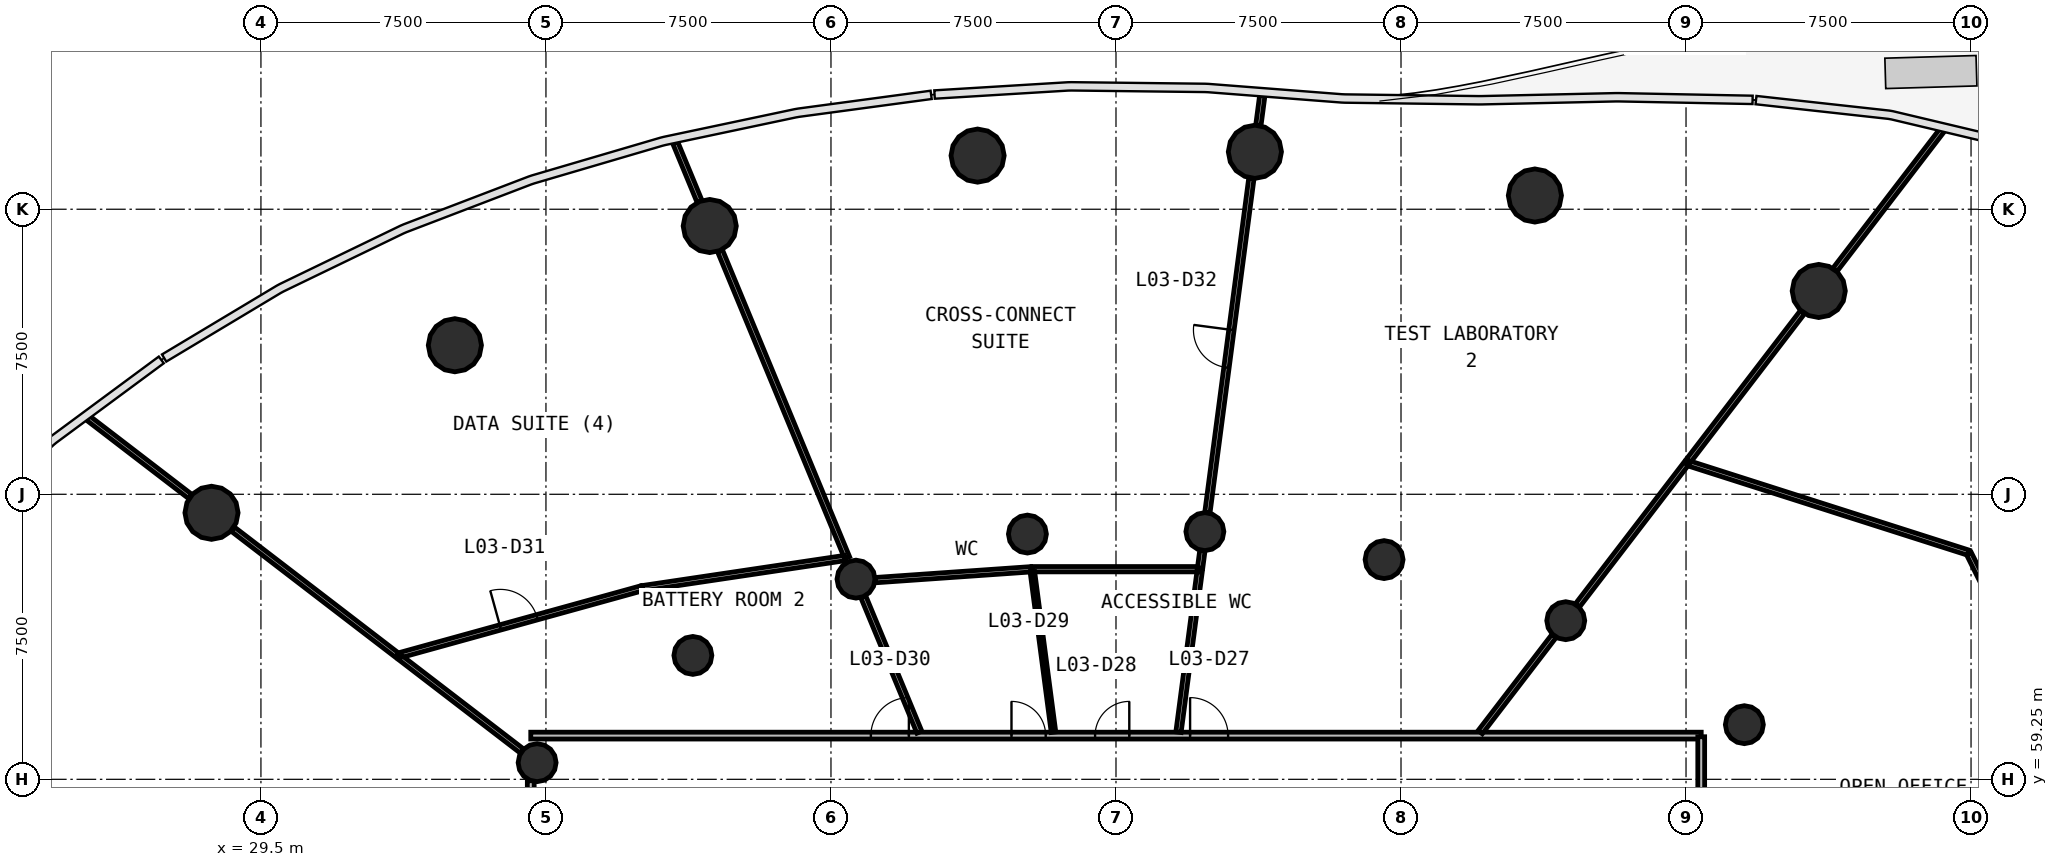
"""IFC4 building model, lengths in metres.
Left out: names, types, materials, properties, quantities, classifications, styles, units other than length and angle.
Written with IfcOpenShell. Run it as: python <this file> out.ifc"""

import sys

from ifc_helpers import new_model, si_unit, direction, frame, frame_2d, origin, origin_2d, place, context, subcontext, project, spatial, rectangle, circle, extrude, source, transform, mapped, element, fill, save


model = new_model("IFC4")
c1 = context("Model", 3, precision=1e-05, world=origin(), true_north=direction((0.0, 1.0)))
c2 = subcontext(c1, "Body", "Model", "MODEL_VIEW")
j1 = project(units=[si_unit("LENGTHUNIT", "METRE"), si_unit("PLANEANGLEUNIT", "RADIAN")], contexts=[c1])
p1 = place(None, origin())
s1 = spatial("IfcSite", under=j1, at=p1, CompositionType="ELEMENT")
p2 = place(p1, origin())
s2 = spatial("IfcBuilding", under=s1, at=p2, CompositionType="ELEMENT")
p3 = place(p2, frame((0.0, 0.0, 13.8)))
s3 = spatial("IfcBuildingStorey", under=s2, at=p3, CompositionType="ELEMENT", Elevation=13.8)
m1 = source(origin(), c2, "Body", "SweptSolid", [
    extrude(circle(Radius=0.7, at=origin_2d()), origin(), (0.0, 0.0, 1.0), 4.4),
])
for number, where, z_axis, x_axis in (
    (1, (70.492, 72.1, 0.0), (0.0, 0.0, 1.0), (1.0, 0.0, 0.0)),
    (2, (63.023, 74.611, 0.0), (0.0, 0.0, 1.0), (1.0, 0.0, 0.0)),
    (3, (55.655, 75.761, 0.0), (0.0, 0.0, 1.0), (1.0, 0.0, 0.0)),
    (4, (48.358, 75.661, 0.0), (0.0, 0.0, 1.0), (1.0, 0.0, 0.0)),
    (5, (41.31, 73.809, 0.0), (0.0, 0.0, 1.0), (1.0, 0.0, 0.0)),
    (6, (34.604, 70.672, 0.0), (0.0, 0.0, 1.0), (1.0, 0.0, 0.0)),
    (7, (28.199, 66.263, 0.0), (0.0, 0.0, 1.0), (1.0, 0.0, 0.0)),
):
    element("IfcColumn", number, at=place(p3, frame(where, z_axis=z_axis, x_axis=x_axis)), inside=s3, PredefinedType="COLUMN", context=c2, shape_type="MappedRepresentation", body=[
        mapped(m1, transform((0.0, 0.0, 0.0), scale=1.0)),
    ])
m2 = source(origin(), c2, "Body", "SweptSolid", [
    extrude(circle(Radius=0.5, at=origin_2d()), origin(), (0.0, 0.0, 1.0), 4.4),
])
for number, where, z_axis, x_axis in (
    (8, (68.535, 60.688, 0.0), (0.0, 0.0, 1.0), (1.0, 0.0, 0.0)),
    (9, (63.835, 63.424, 0.0), (0.0, 0.0, 1.0), (1.0, 0.0, 0.0)),
    (10, (59.055, 65.031, 0.0), (0.0, 0.0, 1.0), (1.0, 0.0, 0.0)),
    (11, (54.339, 65.767, 0.0), (0.0, 0.0, 1.0), (1.0, 0.0, 0.0)),
    (12, (49.669, 65.703, 0.0), (0.0, 0.0, 1.0), (1.0, 0.0, 0.0)),
    (13, (45.158, 64.518, 0.0), (0.0, 0.0, 1.0), (1.0, 0.0, 0.0)),
    (14, (40.866, 62.51, 0.0), (0.0, 0.0, 1.0), (1.0, 0.0, 0.0)),
    (15, (36.768, 59.688, 0.0), (0.0, 0.0, 1.0), (1.0, 0.0, 0.0)),
):
    element("IfcColumn", number, at=place(p3, frame(where, z_axis=z_axis, x_axis=x_axis)), inside=s3, PredefinedType="COLUMN", context=c2, shape_type="MappedRepresentation", body=[
        mapped(m2, transform((0.0, 0.0, 0.0), scale=1.0)),
    ])
p4 = place(p3, frame((36.6, 60.4, 0.0), z_axis=(0.0, 0.0, 1.0), x_axis=(1.0, 0.0, 0.0)))
e16 = element("IfcWall", 16, at=p4, inside=s3, PredefinedType="PARTITIONING", context=c2, shape_type="SweptSolid", body=[
    extrude(rectangle(XDim=30.8, YDim=0.18, at=frame_2d((15.4, 0.0))), origin(), (0.0, 0.0, 1.0), 3.25),
])
p5 = place(p4, frame((17.35, 0.0, 0.0)))
e17 = element("IfcOpeningElement", 17, at=p5, cuts=e16, PredefinedType="OPENING", context=c2, shape_type="SweptSolid", body=[
    extrude(rectangle(XDim=1.0, YDim=2.1, at=frame_2d((0.5, 1.05))), frame((0.0, 0.1, 0.0), z_axis=(0.0, -1.0, 0.0), x_axis=(1.0, 0.0, 0.0)), (0.0, 0.0, 1.0), 0.2),
])
p6 = place(p4, frame((14.85, 0.0, 0.0)))
e18 = element("IfcOpeningElement", 18, at=p6, cuts=e16, PredefinedType="OPENING", context=c2, shape_type="SweptSolid", body=[
    extrude(rectangle(XDim=0.9, YDim=2.1, at=frame_2d((0.45, 1.05))), frame((0.0, 0.1, 0.0), z_axis=(0.0, -1.0, 0.0), x_axis=(1.0, 0.0, 0.0)), (0.0, 0.0, 1.0), 0.2),
])
p7 = place(p4, frame((12.65, 0.0, 0.0)))
e19 = element("IfcOpeningElement", 19, at=p7, cuts=e16, PredefinedType="OPENING", context=c2, shape_type="SweptSolid", body=[
    extrude(rectangle(XDim=0.9, YDim=2.1, at=frame_2d((0.45, 1.05))), frame((0.0, 0.1, 0.0), z_axis=(0.0, -1.0, 0.0), x_axis=(1.0, 0.0, 0.0)), (0.0, 0.0, 1.0), 0.2),
])
p8 = place(p4, frame((8.95, 0.0, 0.0)))
e20 = element("IfcOpeningElement", 20, at=p8, cuts=e16, PredefinedType="OPENING", context=c2, shape_type="SweptSolid", body=[
    extrude(rectangle(XDim=1.0, YDim=2.1, at=frame_2d((0.5, 1.05))), frame((0.0, 0.1, 0.0), z_axis=(0.0, -1.0, 0.0), x_axis=(1.0, 0.0, 0.0)), (0.0, 0.0, 1.0), 0.2),
])
p9 = place(p3, frame((67.4, 60.37, 0.0), z_axis=(0.0, 0.0, 1.0), x_axis=(0.0, -1.0, 0.0)))
e21 = element("IfcWall", 21, at=p9, inside=s3, PredefinedType="PARTITIONING", context=c2, shape_type="SweptSolid", body=[
    extrude(rectangle(XDim=23.583, YDim=0.18, at=frame_2d((11.791, 0.0))), origin(), (0.0, 0.0, 1.0), 3.25),
])
p10 = place(p9, frame((11.333, 0.0, 0.0)))
e22 = element("IfcOpeningElement", 22, at=p10, cuts=e21, PredefinedType="OPENING", context=c2, shape_type="SweptSolid", body=[
    extrude(rectangle(XDim=1.0, YDim=2.1, at=frame_2d((0.5, 1.05))), frame((0.0, 0.1, 0.0), z_axis=(0.0, -1.0, 0.0), x_axis=(1.0, 0.0, 0.0)), (0.0, 0.0, 1.0), 0.2),
])
p11 = place(p9, frame((9.133, 0.0, 0.0)))
e23 = element("IfcOpeningElement", 23, at=p11, cuts=e21, PredefinedType="OPENING", context=c2, shape_type="SweptSolid", body=[
    extrude(rectangle(XDim=1.0, YDim=2.1, at=frame_2d((0.5, 1.05))), frame((0.0, 0.1, 0.0), z_axis=(0.0, -1.0, 0.0), x_axis=(1.0, 0.0, 0.0)), (0.0, 0.0, 1.0), 0.2),
])
p12 = place(p9, frame((19.133, 0.0, 0.0)))
e24 = element("IfcOpeningElement", 24, at=p12, cuts=e21, PredefinedType="OPENING", context=c2, shape_type="SweptSolid", body=[
    extrude(rectangle(XDim=1.0, YDim=2.1, at=frame_2d((0.5, 1.05))), frame((0.0, 0.1, 0.0), z_axis=(0.0, -1.0, 0.0), x_axis=(1.0, 0.0, 0.0)), (0.0, 0.0, 1.0), 0.2),
])
p13 = place(p3, frame((36.6, 35.63, 0.0), z_axis=(0.0, 0.0, 1.0), x_axis=(0.0, 1.0, 0.0)))
e25 = element("IfcWall", 25, at=p13, inside=s3, PredefinedType="PARTITIONING", context=c2, shape_type="SweptSolid", body=[
    extrude(rectangle(XDim=23.583, YDim=0.18, at=frame_2d((11.791, 0.0))), origin(), (0.0, 0.0, 1.0), 3.25),
])
p14 = place(p13, frame((11.333, 0.0, 0.0)))
e26 = element("IfcOpeningElement", 26, at=p14, cuts=e25, PredefinedType="OPENING", context=c2, shape_type="SweptSolid", body=[
    extrude(rectangle(XDim=1.0, YDim=2.1, at=frame_2d((0.5, 1.05))), frame((0.0, 0.1, 0.0), z_axis=(0.0, -1.0, 0.0), x_axis=(1.0, 0.0, 0.0)), (0.0, 0.0, 1.0), 0.2),
])
p15 = place(p3, frame((54.405, 66.267, 0.0), z_axis=(0.0, 0.0, 1.0), x_axis=(0.130521426482, 0.991445488783, 0.0)))
e27 = element("IfcWall", 27, at=p15, inside=s3, PredefinedType="PARTITIONING", context=c2, shape_type="SweptSolid", body=[
    extrude(rectangle(XDim=8.872, YDim=0.14, at=frame_2d((4.436, 0.0))), origin(), (0.0, 0.0, 1.0), 3.25),
])
p16 = place(p15, frame((3.85, 0.0, 0.0)))
e28 = element("IfcOpeningElement", 28, at=p16, cuts=e27, PredefinedType="OPENING", context=c2, shape_type="SweptSolid", body=[
    extrude(rectangle(XDim=1.0, YDim=2.1, at=frame_2d((0.5, 1.05))), frame((0.0, 0.08, 0.0), z_axis=(0.0, -1.0, 0.0), x_axis=(1.0, 0.0, 0.0)), (0.0, 0.0, 1.0), 0.16),
])
p17 = place(p3, frame((44.925, 65.081, 0.0), z_axis=(0.0, 0.0, 1.0), x_axis=(-0.382688905141, 0.923877265594, 0.0)))
e29 = element("IfcWall", 29, at=p17, inside=s3, PredefinedType="PARTITIONING", context=c2, shape_type="SweptSolid", body=[
    extrude(rectangle(XDim=8.741, YDim=0.14, at=frame_2d((4.371, 0.0))), origin(), (0.0, 0.0, 1.0), 3.25),
])
p18 = place(p3, frame((74.432, 65.213, 0.0), z_axis=(0.0, 0.0, 1.0), x_axis=(-0.952603673554, 0.304214136967, 0.0)))
e30 = element("IfcWall", 30, at=p18, inside=s3, PredefinedType="PARTITIONING", context=c2, shape_type="SweptSolid", body=[
    extrude(rectangle(XDim=7.777, YDim=0.14, at=frame_2d((3.889, 0.0))), origin(), (0.0, 0.0, 1.0), 3.25),
])
p19 = place(p3, frame((77.696, 58.644, 0.0), z_axis=(0.0, 0.0, 1.0), x_axis=(-0.444912861123, 0.895573864071, 0.0)))
e31 = element("IfcWall", 31, at=p19, inside=s3, PredefinedType="PARTITIONING", context=c2, shape_type="SweptSolid", body=[
    extrude(rectangle(XDim=7.305, YDim=0.14, at=frame_2d((3.653, 0.0))), origin(), (0.0, 0.0, 1.0), 3.25),
])
p20 = place(p3, frame((33.102, 62.501, 0.0), z_axis=(0.0, 0.0, 1.0), x_axis=(0.963795064715, 0.266644094687, 0.0)))
e32 = element("IfcWall", 32, at=p20, inside=s3, PredefinedType="PARTITIONING", context=c2, shape_type="SweptSolid", body=[
    extrude(rectangle(XDim=6.651, YDim=0.14, at=frame_2d((3.325, 0.0))), origin(), (0.0, 0.0, 1.0), 3.25),
])
p21 = place(p20, frame((2.801, 0.0, 0.0)))
e33 = element("IfcOpeningElement", 33, at=p21, cuts=e32, PredefinedType="OPENING", context=c2, shape_type="SweptSolid", body=[
    extrude(rectangle(XDim=1.0, YDim=2.1, at=frame_2d((0.5, 1.05))), frame((0.0, 0.08, 0.0), z_axis=(0.0, -1.0, 0.0), x_axis=(1.0, 0.0, 0.0)), (0.0, 0.0, 1.0), 0.16),
])
p22 = place(p3, frame((33.078, 62.519, 0.0), z_axis=(0.0, 0.0, 1.0), x_axis=(-0.793366729699, 0.608743979196, 0.0)))
e34 = element("IfcWall", 34, at=p22, inside=s3, PredefinedType="PARTITIONING", context=c2, shape_type="SweptSolid", body=[
    extrude(rectangle(XDim=5.446, YDim=0.14, at=frame_2d((2.723, 0.0))), origin(), (0.0, 0.0, 1.0), 3.25),
])
p23 = place(p3, frame((44.854, 65.071, 0.0), z_axis=(0.0, 0.0, 1.0), x_axis=(-0.989071989563, -0.147433372962, 0.0)))
e35 = element("IfcWall", 35, at=p23, inside=s3, PredefinedType="PARTITIONING", context=c2, shape_type="SweptSolid", body=[
    extrude(rectangle(XDim=5.37, YDim=0.14, at=frame_2d((2.685, 0.0))), origin(), (0.0, 0.0, 1.0), 3.25),
])
p24 = place(p3, frame((67.069, 67.638, 0.0), z_axis=(0.0, 0.0, 1.0), x_axis=(0.608784649219, 0.793335522258, 0.0)))
e36 = element("IfcWall", 36, at=p24, inside=s3, PredefinedType="PARTITIONING", context=c2, shape_type="SweptSolid", body=[
    extrude(rectangle(XDim=4.92, YDim=0.14, at=frame_2d((2.46, 0.0))), origin(), (0.0, 0.0, 1.0), 3.25),
])
p25 = place(p3, frame((64.142, 63.824, 0.0), z_axis=(0.0, 0.0, 1.0), x_axis=(0.608759522286, 0.793354803368, 0.0)))
e37 = element("IfcWall", 37, at=p25, inside=s3, PredefinedType="PARTITIONING", context=c2, shape_type="SweptSolid", body=[
    extrude(rectangle(XDim=4.703, YDim=0.14, at=frame_2d((2.352, 0.0))), origin(), (0.0, 0.0, 1.0), 3.25),
])
p26 = place(p3, frame((70.921, 72.658, 0.0), z_axis=(0.0, 0.0, 1.0), x_axis=(0.608770448494, 0.793346419315, 0.0)))
e38 = element("IfcWall", 38, at=p26, inside=s3, PredefinedType="PARTITIONING", context=c2, shape_type="SweptSolid", body=[
    extrude(rectangle(XDim=4.657, YDim=0.14, at=frame_2d((2.329, 0.0))), origin(), (0.0, 0.0, 1.0), 3.25),
])
p27 = place(p3, frame((54.209, 64.778, 0.0), z_axis=(0.0, 0.0, 1.0), x_axis=(-1.0, 0.0, 0.0)))
e39 = element("IfcWall", 39, at=p27, inside=s3, PredefinedType="PARTITIONING", context=c2, shape_type="SweptSolid", body=[
    extrude(rectangle(XDim=4.418, YDim=0.14, at=frame_2d((2.209, 0.0))), origin(), (0.0, 0.0, 1.0), 3.25),
])
p28 = place(p3, frame((53.644, 60.49, 0.0), z_axis=(0.0, 0.0, 1.0), x_axis=(0.130536146656, 0.991443550797, 0.0)))
e40 = element("IfcWall", 40, at=p28, inside=s3, PredefinedType="PARTITIONING", context=c2, shape_type="SweptSolid", body=[
    extrude(rectangle(XDim=4.255, YDim=0.14, at=frame_2d((2.127, 0.0))), origin(), (0.0, 0.0, 1.0), 3.25),
])
p29 = place(p3, frame((49.761, 64.776, 0.0), z_axis=(0.0, 0.0, 1.0), x_axis=(-0.997577019017, -0.069570763461, 0.0)))
e41 = element("IfcWall", 41, at=p29, inside=s3, PredefinedType="PARTITIONING", context=c2, shape_type="SweptSolid", body=[
    extrude(rectangle(XDim=4.109, YDim=0.14, at=frame_2d((2.055, 0.0))), origin(), (0.0, 0.0, 1.0), 3.25),
])
p30 = place(p3, frame((36.367, 59.995, 0.0), z_axis=(0.0, 0.0, 1.0), x_axis=(-0.793362422365, 0.608749592837, 0.0)))
e42 = element("IfcWall", 42, at=p30, inside=s3, PredefinedType="PARTITIONING", context=c2, shape_type="SweptSolid", body=[
    extrude(rectangle(XDim=4.028, YDim=0.14, at=frame_2d((2.014, 0.0))), origin(), (0.0, 0.0, 1.0), 3.25),
])
p31 = place(p3, frame((46.826, 60.49, 0.0), z_axis=(0.0, 0.0, 1.0), x_axis=(-0.382644558062, 0.923895633817, 0.0)))
e43 = element("IfcWall", 43, at=p31, inside=s3, PredefinedType="PARTITIONING", context=c2, shape_type="SweptSolid", body=[
    extrude(rectangle(XDim=3.854, YDim=0.14, at=frame_2d((1.927, 0.0))), origin(), (0.0, 0.0, 1.0), 3.25),
])
p32 = place(p3, frame((27.641, 66.691, 0.0), z_axis=(0.0, 0.0, 1.0), x_axis=(-0.793332688102, 0.60878834252, 0.0)))
e44 = element("IfcWall", 44, at=p32, inside=s3, PredefinedType="PARTITIONING", context=c2, shape_type="SweptSolid", body=[
    extrude(rectangle(XDim=3.404, YDim=0.14, at=frame_2d((1.702, 0.0))), origin(), (0.0, 0.0, 1.0), 3.25),
])
p33 = place(p3, frame((61.584, 60.49, 0.0), z_axis=(0.0, 0.0, 1.0), x_axis=(0.60874605662, 0.793365135703, 0.0)))
e45 = element("IfcWall", 45, at=p33, inside=s3, PredefinedType="PARTITIONING", context=c2, shape_type="SweptSolid", body=[
    extrude(rectangle(XDim=3.194, YDim=0.14, at=frame_2d((1.597, 0.0))), origin(), (0.0, 0.0, 1.0), 3.25),
])
p34 = place(p3, frame((41.04, 74.46, 0.0), z_axis=(0.0, 0.0, 1.0), x_axis=(-0.382571117301, 0.923926046936, 0.0)))
e46 = element("IfcWall", 46, at=p34, inside=s3, PredefinedType="PARTITIONING", context=c2, shape_type="SweptSolid", body=[
    extrude(rectangle(XDim=1.671, YDim=0.14, at=frame_2d((0.836, 0.0))), origin(), (0.0, 0.0, 1.0), 3.25),
])
p35 = place(p3, frame((55.747, 76.46, 0.0), z_axis=(0.0, 0.0, 1.0), x_axis=(0.130598952658, 0.991435279564, 0.0)))
e47 = element("IfcWall", 47, at=p35, inside=s3, PredefinedType="PARTITIONING", context=c2, shape_type="SweptSolid", body=[
    extrude(rectangle(XDim=0.787, YDim=0.14, at=frame_2d((0.394, 0.0))), origin(), (0.0, 0.0, 1.0), 3.25),
])
p36 = place(p3, frame((54.213, 64.808, 0.0), z_axis=(0.0, 0.0, 1.0), x_axis=(0.130263517927, 0.991479407702, 0.0)))
e48 = element("IfcWall", 48, at=p36, inside=s3, PredefinedType="PARTITIONING", context=c2, shape_type="SweptSolid", body=[
    extrude(rectangle(XDim=0.463, YDim=0.14, at=frame_2d((0.231, 0.0))), origin(), (0.0, 0.0, 1.0), 3.25),
])
p37 = place(p3, frame((50.356, 60.49, 0.0), z_axis=(0.0, 0.0, 1.0), x_axis=(-0.130536146656, 0.991443550797, 0.0)))
e49 = element("IfcWall", 49, at=p37, inside=s3, PredefinedType="PARTITIONING", context=c2, shape_type="SweptSolid", body=[
    extrude(rectangle(XDim=4.255, YDim=0.12, at=frame_2d((2.127, 0.0))), origin(), (0.0, 0.0, 1.0), 3.25),
])
m3 = source(origin(), c2, "Body", "SweptSolid", [
    extrude(rectangle(XDim=1.0, YDim=2.1, at=frame_2d((0.5, 1.05))), frame((0.0, 0.025, 0.0), z_axis=(0.0, -1.0, 0.0), x_axis=(1.0, 0.0, 0.0)), (0.0, 0.0, 1.0), 0.05),
])
p38 = place(p5, origin())
e50 = element("IfcDoor", 50, at=p38, inside=s3, OperationType="SINGLE_SWING_LEFT", PredefinedType="DOOR", context=c2, shape_type="MappedRepresentation", body=[
    mapped(m3, transform((0.0, 0.0, 0.0), scale=1.0)),
])
fill(e17, e50)
m4 = source(origin(), c2, "Body", "SweptSolid", [
    extrude(rectangle(XDim=0.9, YDim=2.1, at=frame_2d((0.45, 1.05))), frame((0.0, 0.025, 0.0), z_axis=(0.0, -1.0, 0.0), x_axis=(1.0, 0.0, 0.0)), (0.0, 0.0, 1.0), 0.05),
])
p39 = place(p6, origin())
e51 = element("IfcDoor", 51, at=p39, inside=s3, OperationType="SINGLE_SWING_RIGHT", PredefinedType="DOOR", context=c2, shape_type="MappedRepresentation", body=[
    mapped(m4, transform((0.0, 0.0, 0.0), scale=1.0)),
])
fill(e18, e51)
p40 = place(p7, origin())
e52 = element("IfcDoor", 52, at=p40, inside=s3, OperationType="SINGLE_SWING_LEFT", PredefinedType="DOOR", context=c2, shape_type="MappedRepresentation", body=[
    mapped(m4, transform((0.0, 0.0, 0.0), scale=1.0)),
])
fill(e19, e52)
p41 = place(p8, origin())
e53 = element("IfcDoor", 53, at=p41, inside=s3, OperationType="SINGLE_SWING_RIGHT", PredefinedType="DOOR", context=c2, shape_type="MappedRepresentation", body=[
    mapped(m3, transform((0.0, 0.0, 0.0), scale=1.0)),
])
fill(e20, e53)
p42 = place(p21, origin())
e54 = element("IfcDoor", 54, at=p42, inside=s3, OperationType="SINGLE_SWING_LEFT", PredefinedType="DOOR", context=c2, shape_type="MappedRepresentation", body=[
    mapped(m3, transform((0.0, 0.0, 0.0), scale=1.0)),
])
fill(e33, e54)
p43 = place(p16, origin())
e55 = element("IfcDoor", 55, at=p43, inside=s3, OperationType="SINGLE_SWING_RIGHT", PredefinedType="DOOR", context=c2, shape_type="MappedRepresentation", body=[
    mapped(m3, transform((0.0, 0.0, 0.0), scale=1.0)),
])
fill(e28, e55)
save(model, sys.argv[1])
